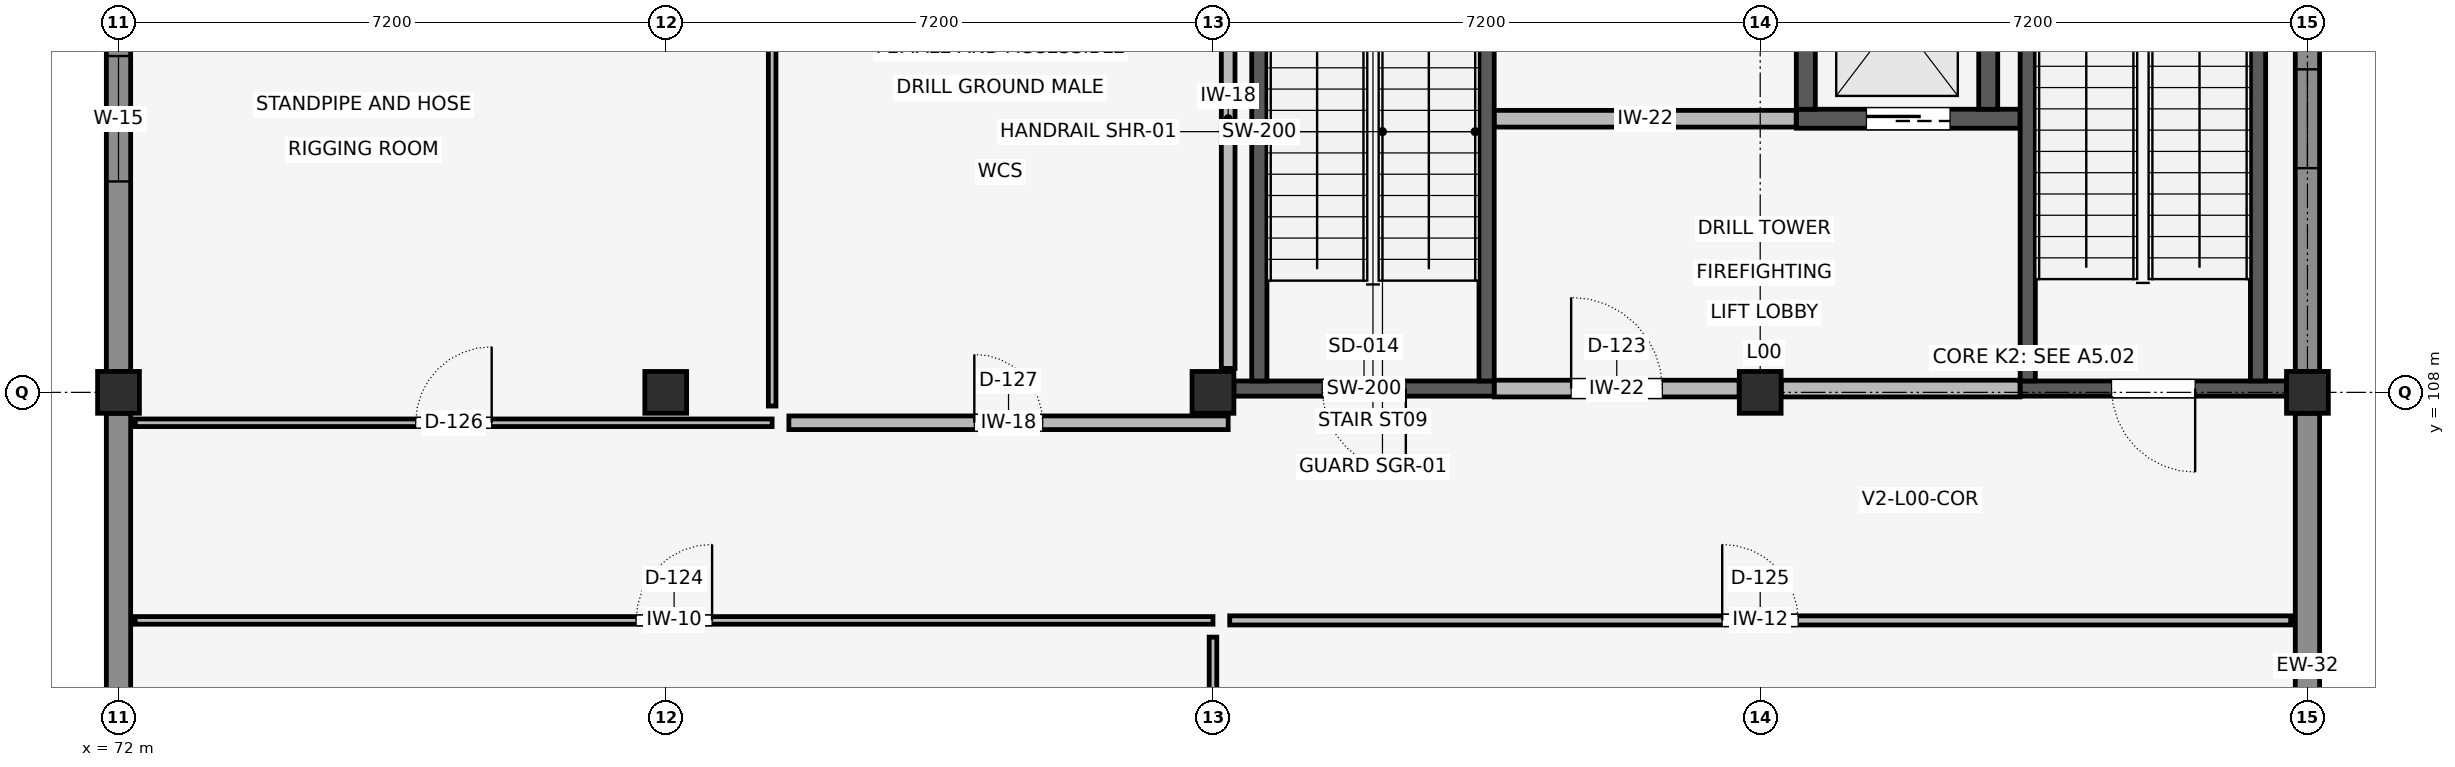
"""IFC4 building model, lengths in metres.
Left out: names, types, materials, properties, quantities, classifications, styles, units other than length and angle.
Written with IfcOpenShell. Run it as: python <this file> out.ifc"""

import sys

from ifc_helpers import new_model, si_unit, direction, frame, frame_2d, origin, origin_2d, place, context, subcontext, project, spatial, rectangle, extrude, element, fill, save


model = new_model("IFC4")
c1 = context("Model", 3, precision=1e-05, world=origin(), true_north=direction((0.0, 1.0)))
c2 = subcontext(c1, "Body", "Model", "MODEL_VIEW")
j1 = project(units=[si_unit("LENGTHUNIT", "METRE"), si_unit("PLANEANGLEUNIT", "RADIAN")], contexts=[c1])
p1 = place(None, origin())
s1 = spatial("IfcSite", under=j1, at=p1, CompositionType="ELEMENT")
p2 = place(p1, origin())
s2 = spatial("IfcBuilding", under=s1, at=p2, CompositionType="ELEMENT")
p3 = place(p2, origin())
s3 = spatial("IfcBuildingStorey", under=s2, at=p3, CompositionType="ELEMENT", Elevation=0.0)
for number, where, z_axis, x_axis in (
    (1, (72.0, 108.0, 0.0), (0.0, 0.0, 1.0), (1.0, 0.0, 0.0)),
    (2, (79.2, 108.0, 0.0), (0.0, 0.0, 1.0), (1.0, 0.0, 0.0)),
    (3, (86.4, 108.0, 0.0), (0.0, 0.0, 1.0), (1.0, 0.0, 0.0)),
    (4, (93.6, 108.0, 0.0), (0.0, 0.0, 1.0), (1.0, 0.0, 0.0)),
    (5, (100.8, 108.0, 0.0), (0.0, 0.0, 1.0), (1.0, 0.0, 0.0)),
):
    element("IfcColumn", number, at=place(p3, frame(where, z_axis=z_axis, x_axis=x_axis)), inside=s3, PredefinedType="COLUMN", context=c2, shape_type="SweptSolid", body=[
        extrude(rectangle(XDim=0.55, YDim=0.55, at=origin_2d()), origin(), (0.0, 0.0, 1.0), 5.4),
    ])
p4 = place(p3, frame((94.075, 111.6, 0.0), z_axis=(0.0, 0.0, 1.0), x_axis=(1.0, 0.0, 0.0)))
e6 = element("IfcWall", 6, at=p4, inside=s3, PredefinedType="SHEAR", context=c2, shape_type="SweptSolid", body=[
    extrude(rectangle(XDim=2.945, YDim=0.25, at=frame_2d((1.473, 0.0))), origin(), (0.0, 0.0, 1.0), 5.18),
])
p5 = place(p4, frame((0.923, 0.0, 0.0)))
e7 = element("IfcOpeningElement", 7, at=p5, cuts=e6, PredefinedType="OPENING", context=c2, shape_type="SweptSolid", body=[
    extrude(rectangle(XDim=1.1, YDim=2.15, at=frame_2d((0.55, 1.075))), frame((0.0, 0.137, 0.0), z_axis=(0.0, -1.0, 0.0), x_axis=(1.0, 0.0, 0.0)), (0.0, 0.0, 1.0), 0.274),
])
for number, where, z_axis, x_axis in (
    (8, (94.2, 111.725, 0.0), (0.0, 0.0, 1.0), (0.0, 1.0, 0.0)),
    (9, (96.6, 111.725, 0.0), (0.0, 0.0, 1.0), (0.0, 1.0, 0.0)),
):
    element("IfcWall", number, at=place(p3, frame(where, z_axis=z_axis, x_axis=x_axis)), inside=s3, PredefinedType="SHEAR", context=c2, shape_type="SweptSolid", body=[
        extrude(rectangle(XDim=2.45, YDim=0.25, at=frame_2d((1.225, 0.0))), origin(), (0.0, 0.0, 1.0), 5.18),
    ])
p6 = place(p3, frame((97.02, 108.05, 0.0), z_axis=(0.0, 0.0, 1.0), x_axis=(1.0, 0.0, 0.0)))
e10 = element("IfcWall", 10, at=p6, inside=s3, PredefinedType="SHEAR", context=c2, shape_type="SweptSolid", body=[
    extrude(rectangle(XDim=3.505, YDim=0.2, at=frame_2d((1.752, 0.0))), origin(), (0.0, 0.0, 1.0), 5.18),
])
p7 = place(p6, frame((1.202, 0.0, 0.0)))
e11 = element("IfcOpeningElement", 11, at=p7, cuts=e10, PredefinedType="OPENING", context=c2, shape_type="SweptSolid", body=[
    extrude(rectangle(XDim=1.1, YDim=2.15, at=frame_2d((0.55, 1.075))), frame((0.0, 0.112, 0.0), z_axis=(0.0, -1.0, 0.0), x_axis=(1.0, 0.0, 0.0)), (0.0, 0.0, 1.0), 0.224),
])
for number, where, z_axis, x_axis in (
    (12, (97.12, 108.15, 0.0), (0.0, 0.0, 1.0), (0.0, 1.0, 0.0)),
    (13, (100.15, 108.15, 0.0), (0.0, 0.0, 1.0), (0.0, 1.0, 0.0)),
):
    element("IfcWall", number, at=place(p3, frame(where, z_axis=z_axis, x_axis=x_axis)), inside=s3, PredefinedType="SHEAR", context=c2, shape_type="SweptSolid", body=[
        extrude(rectangle(XDim=6.6, YDim=0.2, at=frame_2d((3.3, 0.0))), origin(), (0.0, 0.0, 1.0), 5.18),
    ])
p8 = place(p3, frame((86.675, 108.05, 0.0), z_axis=(0.0, 0.0, 1.0), x_axis=(1.0, 0.0, 0.0)))
e14 = element("IfcWall", 14, at=p8, inside=s3, PredefinedType="SHEAR", context=c2, shape_type="SweptSolid", body=[
    extrude(rectangle(XDim=3.425, YDim=0.2, at=frame_2d((1.712, 0.0))), origin(), (0.0, 0.0, 1.0), 5.18),
])
p9 = place(p8, frame((1.163, 0.0, 0.0)))
e15 = element("IfcOpeningElement", 15, at=p9, cuts=e14, PredefinedType="OPENING", context=c2, shape_type="SweptSolid", body=[
    extrude(rectangle(XDim=1.1, YDim=2.15, at=frame_2d((0.55, 1.075))), frame((0.0, 0.112, 0.0), z_axis=(0.0, -1.0, 0.0), x_axis=(1.0, 0.0, 0.0)), (0.0, 0.0, 1.0), 0.224),
])
for number, where, z_axis, x_axis in (
    (16, (87.01, 108.15, 0.0), (0.0, 0.0, 1.0), (0.0, 1.0, 0.0)),
    (17, (90.0, 108.15, 0.0), (0.0, 0.0, 1.0), (0.0, 1.0, 0.0)),
):
    element("IfcWall", number, at=place(p3, frame(where, z_axis=z_axis, x_axis=x_axis)), inside=s3, PredefinedType="SHEAR", context=c2, shape_type="SweptSolid", body=[
        extrude(rectangle(XDim=6.56, YDim=0.2, at=frame_2d((3.28, 0.0))), origin(), (0.0, 0.0, 1.0), 5.18),
    ])
p10 = place(p3, frame((100.8, 101.075, 0.0), z_axis=(0.0, 0.0, 1.0), x_axis=(0.0, 1.0, 0.0)))
e18 = element("IfcWall", 18, at=p10, inside=s3, PredefinedType="ELEMENTEDWALL", context=c2, shape_type="SweptSolid", body=[
    extrude(rectangle(XDim=6.65, YDim=0.32, at=frame_2d((3.325, 0.0))), origin(), (0.0, 0.0, 1.0), 4.52),
])
p11 = place(p3, frame((100.8, 108.275, 0.0), z_axis=(0.0, 0.0, 1.0), x_axis=(0.0, 1.0, 0.0)))
e19 = element("IfcWall", 19, at=p11, inside=s3, PredefinedType="ELEMENTEDWALL", context=c2, shape_type="SweptSolid", body=[
    extrude(rectangle(XDim=6.65, YDim=0.32, at=frame_2d((3.325, 0.0))), origin(), (0.0, 0.0, 1.0), 4.57),
])
p12 = place(p11, frame((2.675, 0.0, 0.85)))
e20 = element("IfcOpeningElement", 20, at=p12, cuts=e19, PredefinedType="OPENING", context=c2, shape_type="SweptSolid", body=[
    extrude(rectangle(XDim=1.3, YDim=1.85, at=frame_2d((0.65, 0.925))), frame((0.0, 0.172, 0.0), z_axis=(0.0, -1.0, 0.0), x_axis=(1.0, 0.0, 0.0)), (0.0, 0.0, 1.0), 0.344),
])
p13 = place(p3, frame((72.0, 114.925, 0.0), z_axis=(0.0, 0.0, 1.0), x_axis=(0.0, -1.0, 0.0)))
e21 = element("IfcWall", 21, at=p13, inside=s3, PredefinedType="ELEMENTEDWALL", context=c2, shape_type="SweptSolid", body=[
    extrude(rectangle(XDim=6.65, YDim=0.32, at=frame_2d((3.325, 0.0))), origin(), (0.0, 0.0, 1.0), 4.55),
])
p14 = place(p13, frame((2.5, 0.0, 0.85)))
e22 = element("IfcOpeningElement", 22, at=p14, cuts=e21, PredefinedType="OPENING", context=c2, shape_type="SweptSolid", body=[
    extrude(rectangle(XDim=1.65, YDim=1.9, at=frame_2d((0.825, 0.95))), frame((0.0, 0.172, 0.0), z_axis=(0.0, -1.0, 0.0), x_axis=(1.0, 0.0, 0.0)), (0.0, 0.0, 1.0), 0.344),
])
p15 = place(p3, frame((72.0, 107.725, 0.0), z_axis=(0.0, 0.0, 1.0), x_axis=(0.0, -1.0, 0.0)))
e23 = element("IfcWall", 23, at=p15, inside=s3, PredefinedType="ELEMENTEDWALL", context=c2, shape_type="SweptSolid", body=[
    extrude(rectangle(XDim=6.65, YDim=0.32, at=frame_2d((3.325, 0.0))), origin(), (0.0, 0.0, 1.0), 4.5),
])
p16 = place(p3, frame((90.102, 108.05, 0.0), z_axis=(0.0, 0.0, 1.0), x_axis=(1.0, 0.0, 0.0)))
e24 = element("IfcWall", 24, at=p16, inside=s3, PredefinedType="STANDARD", context=c2, shape_type="SweptSolid", body=[
    extrude(rectangle(XDim=3.221, YDim=0.22, at=frame_2d((1.61, 0.0))), origin(), (0.0, 0.0, 1.0), 5.12),
])
p17 = place(p16, frame((1.01, 0.0, 0.0)))
e25 = element("IfcOpeningElement", 25, at=p17, cuts=e24, PredefinedType="OPENING", context=c2, shape_type="SweptSolid", body=[
    extrude(rectangle(XDim=1.2, YDim=2.2, at=frame_2d((0.6, 1.1))), frame((0.0, 0.122, 0.0), z_axis=(0.0, -1.0, 0.0), x_axis=(1.0, 0.0, 0.0)), (0.0, 0.0, 1.0), 0.244),
])
p18 = place(p3, frame((93.877, 108.05, 0.0), z_axis=(0.0, 0.0, 1.0), x_axis=(1.0, 0.0, 0.0)))
e26 = element("IfcWall", 26, at=p18, inside=s3, PredefinedType="STANDARD", context=c2, shape_type="SweptSolid", body=[
    extrude(rectangle(XDim=3.141, YDim=0.22, at=frame_2d((1.571, 0.0))), origin(), (0.0, 0.0, 1.0), 5.12),
])
p19 = place(p3, frame((90.102, 111.6, 0.0), z_axis=(0.0, 0.0, 1.0), x_axis=(1.0, 0.0, 0.0)))
e27 = element("IfcWall", 27, at=p19, inside=s3, PredefinedType="STANDARD", context=c2, shape_type="SweptSolid", body=[
    extrude(rectangle(XDim=3.971, YDim=0.22, at=frame_2d((1.985, 0.0))), origin(), (0.0, 0.0, 1.0), 4.518),
])
p20 = place(p3, frame((72.22, 105.0, 0.0), z_axis=(0.0, 0.0, 1.0), x_axis=(1.0, 0.0, 0.0)))
e28 = element("IfcWall", 28, at=p20, inside=s3, PredefinedType="PARTITIONING", context=c2, shape_type="SweptSolid", body=[
    extrude(rectangle(XDim=14.18, YDim=0.1, at=frame_2d((7.09, 0.0))), origin(), (0.0, 0.0, 1.0), 4.518),
])
p21 = place(p20, frame((6.59, 0.0, 0.0)))
e29 = element("IfcOpeningElement", 29, at=p21, cuts=e28, PredefinedType="OPENING", context=c2, shape_type="SweptSolid", body=[
    extrude(rectangle(XDim=1.0, YDim=2.15, at=frame_2d((0.5, 1.075))), frame((0.0, 0.062, 0.0), z_axis=(0.0, -1.0, 0.0), x_axis=(1.0, 0.0, 0.0)), (0.0, 0.0, 1.0), 0.124),
])
p22 = place(p3, frame((86.4, 101.115, 0.0), z_axis=(0.0, 0.0, 1.0), x_axis=(0.0, 1.0, 0.0)))
e30 = element("IfcWall", 30, at=p22, inside=s3, PredefinedType="PARTITIONING", context=c2, shape_type="SweptSolid", body=[
    extrude(rectangle(XDim=3.665, YDim=0.1, at=frame_2d((1.833, 0.0))), origin(), (0.0, 0.0, 1.0), 4.518),
])
p23 = place(p3, frame((86.62, 105.0, 0.0), z_axis=(0.0, 0.0, 1.0), x_axis=(1.0, 0.0, 0.0)))
e31 = element("IfcWall", 31, at=p23, inside=s3, PredefinedType="PARTITIONING", context=c2, shape_type="SweptSolid", body=[
    extrude(rectangle(XDim=13.96, YDim=0.12, at=frame_2d((6.98, 0.0))), origin(), (0.0, 0.0, 1.0), 4.568),
])
p24 = place(p23, frame((6.48, 0.0, 0.0)))
e32 = element("IfcOpeningElement", 32, at=p24, cuts=e31, PredefinedType="OPENING", context=c2, shape_type="SweptSolid", body=[
    extrude(rectangle(XDim=1.0, YDim=2.15, at=frame_2d((0.5, 1.075))), frame((0.0, 0.072, 0.0), z_axis=(0.0, -1.0, 0.0), x_axis=(1.0, 0.0, 0.0)), (0.0, 0.0, 1.0), 0.144),
])
p25 = place(p3, frame((72.22, 107.6, 0.0), z_axis=(0.0, 0.0, 1.0), x_axis=(1.0, 0.0, 0.0)))
e33 = element("IfcWall", 33, at=p25, inside=s3, PredefinedType="PARTITIONING", context=c2, shape_type="SweptSolid", body=[
    extrude(rectangle(XDim=8.38, YDim=0.1, at=frame_2d((4.19, 0.0))), origin(), (0.0, 0.0, 1.0), 4.568),
])
p26 = place(p25, frame((3.69, 0.0, 0.0)))
e34 = element("IfcOpeningElement", 34, at=p26, cuts=e33, PredefinedType="OPENING", context=c2, shape_type="SweptSolid", body=[
    extrude(rectangle(XDim=1.0, YDim=2.15, at=frame_2d((0.5, 1.075))), frame((0.0, 0.062, 0.0), z_axis=(0.0, -1.0, 0.0), x_axis=(1.0, 0.0, 0.0)), (0.0, 0.0, 1.0), 0.124),
])
p27 = place(p3, frame((80.6, 107.82, 0.0), z_axis=(0.0, 0.0, 1.0), x_axis=(0.0, 1.0, 0.0)))
e35 = element("IfcWall", 35, at=p27, inside=s3, PredefinedType="PARTITIONING", context=c2, shape_type="SweptSolid", body=[
    extrude(rectangle(XDim=7.38, YDim=0.1, at=frame_2d((3.69, 0.0))), origin(), (0.0, 0.0, 1.0), 4.418),
])
p28 = place(p3, frame((80.82, 107.6, 0.0), z_axis=(0.0, 0.0, 1.0), x_axis=(1.0, 0.0, 0.0)))
e36 = element("IfcWall", 36, at=p28, inside=s3, PredefinedType="PLUMBINGWALL", context=c2, shape_type="SweptSolid", body=[
    extrude(rectangle(XDim=5.78, YDim=0.18, at=frame_2d((2.89, 0.0))), origin(), (0.0, 0.0, 1.0), 4.518),
])
p29 = place(p28, frame((2.44, 0.0, 0.0)))
e37 = element("IfcOpeningElement", 37, at=p29, cuts=e36, PredefinedType="OPENING", context=c2, shape_type="SweptSolid", body=[
    extrude(rectangle(XDim=0.9, YDim=2.1, at=frame_2d((0.45, 1.05))), frame((0.0, 0.102, 0.0), z_axis=(0.0, -1.0, 0.0), x_axis=(1.0, 0.0, 0.0)), (0.0, 0.0, 1.0), 0.204),
])
p30 = place(p3, frame((86.6, 108.315, 0.0), z_axis=(0.0, 0.0, 1.0), x_axis=(0.0, 1.0, 0.0)))
e38 = element("IfcWall", 38, at=p30, inside=s3, PredefinedType="PLUMBINGWALL", context=c2, shape_type="SweptSolid", body=[
    extrude(rectangle(XDim=6.57, YDim=0.18, at=frame_2d((3.285, 0.0))), origin(), (0.0, 0.0, 1.0), 4.568),
])
p31 = place(p12, origin())
e39 = element("IfcWindow", 39, at=p31, inside=s3, PartitioningType="SINGLE_PANEL", PredefinedType="WINDOW", context=c2, shape_type="SweptSolid", body=[
    extrude(rectangle(XDim=1.3, YDim=1.85, at=frame_2d((0.65, 0.925))), frame((0.0, 0.03, 0.0), z_axis=(0.0, -1.0, 0.0), x_axis=(1.0, 0.0, 0.0)), (0.0, 0.0, 1.0), 0.06),
])
fill(e20, e39)
p32 = place(p14, origin())
e40 = element("IfcWindow", 40, at=p32, inside=s3, PartitioningType="SINGLE_PANEL", PredefinedType="WINDOW", context=c2, shape_type="SweptSolid", body=[
    extrude(rectangle(XDim=1.65, YDim=1.9, at=frame_2d((0.825, 0.95))), frame((0.0, 0.03, 0.0), z_axis=(0.0, -1.0, 0.0), x_axis=(1.0, 0.0, 0.0)), (0.0, 0.0, 1.0), 0.06),
])
fill(e22, e40)
p33 = place(p7, frame((1.1, 0.0, 0.0), z_axis=(0.0, 0.0, 1.0), x_axis=(-1.0, 0.0, 0.0)))
e41 = element("IfcDoor", 41, at=p33, inside=s3, OperationType="SINGLE_SWING_LEFT", PredefinedType="DOOR", context=c2, shape_type="SweptSolid", body=[
    extrude(rectangle(XDim=1.1, YDim=2.15, at=frame_2d((0.55, 1.075))), frame((0.0, 0.025, 0.0), z_axis=(0.0, -1.0, 0.0), x_axis=(1.0, 0.0, 0.0)), (0.0, 0.0, 1.0), 0.05),
])
fill(e11, e41)
p34 = place(p9, frame((1.1, 0.0, 0.0), z_axis=(0.0, 0.0, 1.0), x_axis=(-1.0, 0.0, 0.0)))
e42 = element("IfcDoor", 42, at=p34, inside=s3, OperationType="SINGLE_SWING_LEFT", PredefinedType="DOOR", context=c2, shape_type="SweptSolid", body=[
    extrude(rectangle(XDim=1.1, YDim=2.15, at=frame_2d((0.55, 1.075))), frame((0.0, 0.025, 0.0), z_axis=(0.0, -1.0, 0.0), x_axis=(1.0, 0.0, 0.0)), (0.0, 0.0, 1.0), 0.05),
])
fill(e15, e42)
p35 = place(p5, origin())
e43 = element("IfcDoor", 43, at=p35, inside=s3, OperationType="SLIDING_TO_LEFT", PredefinedType="DOOR", context=c2, shape_type="SweptSolid", body=[
    extrude(rectangle(XDim=1.1, YDim=2.15, at=frame_2d((0.55, 1.075))), frame((0.0, 0.025, 0.0), z_axis=(0.0, -1.0, 0.0), x_axis=(1.0, 0.0, 0.0)), (0.0, 0.0, 1.0), 0.05),
])
fill(e7, e43)
p36 = place(p17, origin())
e44 = element("IfcDoor", 44, at=p36, inside=s3, OperationType="SINGLE_SWING_LEFT", PredefinedType="DOOR", context=c2, shape_type="SweptSolid", body=[
    extrude(rectangle(XDim=1.2, YDim=2.2, at=frame_2d((0.6, 1.1))), frame((0.0, 0.025, 0.0), z_axis=(0.0, -1.0, 0.0), x_axis=(1.0, 0.0, 0.0)), (0.0, 0.0, 1.0), 0.05),
])
fill(e25, e44)
p37 = place(p21, origin())
e45 = element("IfcDoor", 45, at=p37, inside=s3, OperationType="SINGLE_SWING_RIGHT", PredefinedType="DOOR", context=c2, shape_type="SweptSolid", body=[
    extrude(rectangle(XDim=1.0, YDim=2.15, at=frame_2d((0.5, 1.075))), frame((0.0, 0.025, 0.0), z_axis=(0.0, -1.0, 0.0), x_axis=(1.0, 0.0, 0.0)), (0.0, 0.0, 1.0), 0.05),
])
fill(e29, e45)
p38 = place(p24, origin())
e46 = element("IfcDoor", 46, at=p38, inside=s3, OperationType="SINGLE_SWING_LEFT", PredefinedType="DOOR", context=c2, shape_type="SweptSolid", body=[
    extrude(rectangle(XDim=1.0, YDim=2.15, at=frame_2d((0.5, 1.075))), frame((0.0, 0.025, 0.0), z_axis=(0.0, -1.0, 0.0), x_axis=(1.0, 0.0, 0.0)), (0.0, 0.0, 1.0), 0.05),
])
fill(e32, e46)
p39 = place(p26, origin())
e47 = element("IfcDoor", 47, at=p39, inside=s3, OperationType="SINGLE_SWING_RIGHT", PredefinedType="DOOR", context=c2, shape_type="SweptSolid", body=[
    extrude(rectangle(XDim=1.0, YDim=2.15, at=frame_2d((0.5, 1.075))), frame((0.0, 0.025, 0.0), z_axis=(0.0, -1.0, 0.0), x_axis=(1.0, 0.0, 0.0)), (0.0, 0.0, 1.0), 0.05),
])
fill(e34, e47)
p40 = place(p29, origin())
e48 = element("IfcDoor", 48, at=p40, inside=s3, OperationType="SINGLE_SWING_LEFT", PredefinedType="DOOR", context=c2, shape_type="SweptSolid", body=[
    extrude(rectangle(XDim=0.9, YDim=2.1, at=frame_2d((0.45, 1.05))), frame((0.0, 0.025, 0.0), z_axis=(0.0, -1.0, 0.0), x_axis=(1.0, 0.0, 0.0)), (0.0, 0.0, 1.0), 0.05),
])
fill(e37, e48)
save(model, sys.argv[1])
